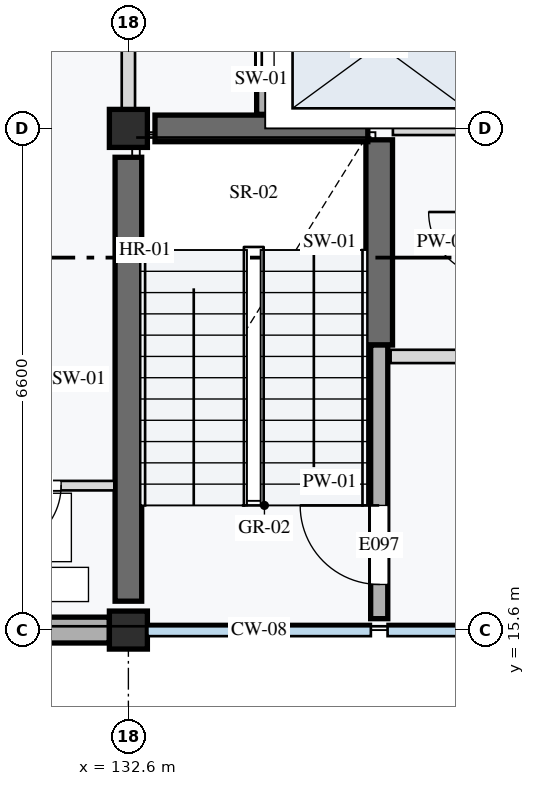
"""IFC4 building model, lengths in metres.
Left out: names, types, materials, properties, quantities, classifications, styles, units other than length and angle.
Written with IfcOpenShell. Run it as: python <this file> out.ifc"""

import sys

from ifc_helpers import new_model, si_unit, direction, frame, frame_2d, origin, origin_2d, place, context, subcontext, project, spatial, rectangle, extrude, element, fill, save


model = new_model("IFC4")
c1 = context("Model", 3, precision=1e-05, world=origin(), true_north=direction((0.0, 1.0)))
c2 = subcontext(c1, "Body", "Model", "MODEL_VIEW")
j1 = project(units=[si_unit("LENGTHUNIT", "METRE"), si_unit("PLANEANGLEUNIT", "RADIAN")], contexts=[c1])
p1 = place(None, origin())
s1 = spatial("IfcSite", under=j1, at=p1, CompositionType="ELEMENT")
p2 = place(p1, origin())
s2 = spatial("IfcBuilding", under=s1, at=p2, CompositionType="ELEMENT")
p3 = place(p2, frame((0.0, 0.0, 4.2)))
s3 = spatial("IfcBuildingStorey", under=s2, at=p3, CompositionType="ELEMENT", Elevation=4.2)
for number, where, z_axis, x_axis in (
    (1, (132.6, 15.6, 0.0), (0.0, 0.0, 1.0), (1.0, 0.0, 0.0)),
    (2, (132.6, 22.2, 0.0), (0.0, 0.0, 1.0), (1.0, 0.0, 0.0)),
):
    element("IfcColumn", number, at=place(p3, frame(where, z_axis=z_axis, x_axis=x_axis)), inside=s3, PredefinedType="COLUMN", context=c2, shape_type="SweptSolid", body=[
        extrude(rectangle(XDim=0.5, YDim=0.5, at=origin_2d()), origin(), (0.0, 0.0, 1.0), 4.2),
    ])
p4 = place(p3, frame((132.6, 15.98, 0.0), z_axis=(0.0, 0.0, 1.0), x_axis=(0.0, 1.0, 0.0)))
e3 = element("IfcWall", 3, at=p4, inside=s3, PredefinedType="SHEAR", context=c2, shape_type="SweptSolid", body=[
    extrude(rectangle(XDim=5.84, YDim=0.35, at=frame_2d((2.92, 0.0))), origin(), (0.0, 0.0, 1.0), 3.96),
])
p5 = place(p3, frame((135.9, 19.35, 0.0), z_axis=(0.0, 0.0, 1.0), x_axis=(0.0, 1.0, 0.0)))
e4 = element("IfcWall", 4, at=p5, inside=s3, PredefinedType="SHEAR", context=c2, shape_type="SweptSolid", body=[
    extrude(rectangle(XDim=2.7, YDim=0.35, at=frame_2d((1.35, 0.0))), origin(), (0.0, 0.0, 1.0), 3.96),
])
p6 = place(p3, frame((132.95, 22.2, 0.0), z_axis=(0.0, 0.0, 1.0), x_axis=(1.0, 0.0, 0.0)))
e5 = element("IfcWall", 5, at=p6, inside=s3, PredefinedType="SHEAR", context=c2, shape_type="SweptSolid", body=[
    extrude(rectangle(XDim=2.8, YDim=0.35, at=frame_2d((1.4, 0.0))), origin(), (0.0, 0.0, 1.0), 3.96),
])
p7 = place(p3, frame((126.25, 15.6, 0.0), z_axis=(0.0, 0.0, 1.0), x_axis=(1.0, 0.0, 0.0)))
e6 = element("IfcWall", 6, at=p7, inside=s3, PredefinedType="STANDARD", context=c2, shape_type="SweptSolid", body=[
    extrude(rectangle(XDim=6.1, YDim=0.34, at=frame_2d((3.05, 0.0))), origin(), (0.0, 0.0, 1.0), 3.65),
])
p8 = place(p3, frame((135.9, 15.75, 0.0), z_axis=(0.0, 0.0, 1.0), x_axis=(0.0, 1.0, 0.0)))
e7 = element("IfcWall", 7, at=p8, inside=s3, PredefinedType="STANDARD", context=c2, shape_type="SweptSolid", body=[
    extrude(rectangle(XDim=3.6, YDim=0.225, at=frame_2d((1.8, 0.0))), origin(), (0.0, 0.0, 1.0), 3.96),
])
p9 = place(p8, frame((0.45, 0.0, 0.0)))
e8 = element("IfcOpeningElement", 8, at=p9, cuts=e7, PredefinedType="OPENING", context=c2, shape_type="SweptSolid", body=[
    extrude(rectangle(XDim=1.04, YDim=2.12, at=frame_2d((0.52, 1.06))), frame((0.0, 0.123, 0.0), z_axis=(0.0, -1.0, 0.0), x_axis=(1.0, 0.0, 0.0)), (0.0, 0.0, 1.0), 0.245),
])
p10 = place(p3, frame((136.05, 19.2, 0.0), z_axis=(0.0, 0.0, 1.0), x_axis=(1.0, 0.0, 0.0)))
e9 = element("IfcWall", 9, at=p10, inside=s3, PredefinedType="PARTITIONING", context=c2, shape_type="SweptSolid", body=[
    extrude(rectangle(XDim=3.0, YDim=0.175, at=frame_2d((1.5, 0.0))), origin(), (0.0, 0.0, 1.0), 3.96),
])
p11 = place(p10, frame((1.65, 0.0, 0.0)))
e10 = element("IfcOpeningElement", 10, at=p11, cuts=e9, PredefinedType="OPENING", context=c2, shape_type="SweptSolid", body=[
    extrude(rectangle(XDim=1.0, YDim=2.1, at=frame_2d((0.5, 1.05))), frame((0.0, 0.097, 0.0), z_axis=(0.0, -1.0, 0.0), x_axis=(1.0, 0.0, 0.0)), (0.0, 0.0, 1.0), 0.195),
])
p12 = place(p3, frame((136.08, 22.2, 0.0), z_axis=(0.0, 0.0, 1.0), x_axis=(1.0, 0.0, 0.0)))
e11 = element("IfcWall", 11, at=p12, inside=s3, PredefinedType="PARTITIONING", context=c2, shape_type="SweptSolid", body=[
    extrude(rectangle(XDim=1.19, YDim=0.175, at=frame_2d((0.595, 0.0))), origin(), (0.0, 0.0, 1.0), 3.96),
])
p13 = place(p3, frame((134.4, 22.385, 0.0), z_axis=(0.0, 0.0, 1.0), x_axis=(0.0, 1.0, 0.0)))
e12 = element("IfcWall", 12, at=p13, inside=s3, PredefinedType="STANDARD", context=c2, shape_type="SweptSolid", body=[
    extrude(rectangle(XDim=2.015, YDim=0.225, at=frame_2d((1.007, 0.0))), origin(), (0.0, 0.0, 1.0), 3.96),
])
p14 = place(p13, frame((0.55, 0.0, 0.0)))
e13 = element("IfcOpeningElement", 13, at=p14, cuts=e12, PredefinedType="OPENING", context=c2, shape_type="SweptSolid", body=[
    extrude(rectangle(XDim=1.1, YDim=2.1, at=frame_2d((0.55, 1.05))), frame((0.0, 0.123, 0.0), z_axis=(0.0, -1.0, 0.0), x_axis=(1.0, 0.0, 0.0)), (0.0, 0.0, 1.0), 0.245),
])
p15 = place(p3, frame((132.6, 22.2, 0.0), z_axis=(0.0, 0.0, 1.0), x_axis=(0.0, 1.0, 0.0)))
e14 = element("IfcWall", 14, at=p15, inside=s3, PredefinedType="PARTITIONING", context=c2, shape_type="SweptSolid", body=[
    extrude(rectangle(XDim=6.6, YDim=0.175, at=frame_2d((3.3, 0.0))), origin(), (0.0, 0.0, 1.0), 3.7),
])
p16 = place(p15, frame((1.7, 0.0, 0.0)))
e15 = element("IfcOpeningElement", 15, at=p16, cuts=e14, PredefinedType="OPENING", context=c2, shape_type="SweptSolid", body=[
    extrude(rectangle(XDim=0.95, YDim=2.16, at=frame_2d((0.475, 1.08))), frame((0.0, 0.097, 0.0), z_axis=(0.0, -1.0, 0.0), x_axis=(1.0, 0.0, 0.0)), (0.0, 0.0, 1.0), 0.195),
])
p17 = place(p3, frame((132.415, 17.5, 0.0), z_axis=(0.0, 0.0, 1.0), x_axis=(-1.0, 0.0, 0.0)))
e16 = element("IfcWall", 16, at=p17, inside=s3, PredefinedType="PARTITIONING", context=c2, shape_type="SweptSolid", body=[
    extrude(rectangle(XDim=2.215, YDim=0.125, at=frame_2d((1.107, 0.0))), origin(), (0.0, 0.0, 1.0), 3.96),
])
p18 = place(p17, frame((0.7, 0.0, 0.0)))
e17 = element("IfcOpeningElement", 17, at=p18, cuts=e16, PredefinedType="OPENING", context=c2, shape_type="SweptSolid", body=[
    extrude(rectangle(XDim=0.84, YDim=2.06, at=frame_2d((0.42, 1.03))), frame((0.0, 0.073, 0.0), z_axis=(0.0, -1.0, 0.0), x_axis=(1.0, 0.0, 0.0)), (0.0, 0.0, 1.0), 0.145),
])
p19 = place(p9, origin())
e18 = element("IfcDoor", 18, at=p19, inside=s3, OperationType="SINGLE_SWING_RIGHT", PredefinedType="DOOR", context=c2, shape_type="SweptSolid", body=[
    extrude(rectangle(XDim=1.04, YDim=2.12, at=frame_2d((0.52, 1.06))), frame((0.0, 0.025, 0.0), z_axis=(0.0, -1.0, 0.0), x_axis=(1.0, 0.0, 0.0)), (0.0, 0.0, 1.0), 0.05),
])
fill(e8, e18)
p20 = place(p14, origin())
e19 = element("IfcDoor", 19, at=p20, inside=s3, OperationType="DOUBLE_DOOR_SLIDING", PredefinedType="DOOR", context=c2, shape_type="SweptSolid", body=[
    extrude(rectangle(XDim=1.1, YDim=2.1, at=frame_2d((0.55, 1.05))), frame((0.0, 0.025, 0.0), z_axis=(0.0, -1.0, 0.0), x_axis=(1.0, 0.0, 0.0)), (0.0, 0.0, 1.0), 0.05),
])
fill(e13, e19)
p21 = place(p18, origin())
e20 = element("IfcDoor", 20, at=p21, inside=s3, OperationType="SINGLE_SWING_RIGHT", PredefinedType="DOOR", context=c2, shape_type="SweptSolid", body=[
    extrude(rectangle(XDim=0.84, YDim=2.06, at=frame_2d((0.42, 1.03))), frame((0.0, 0.025, 0.0), z_axis=(0.0, -1.0, 0.0), x_axis=(1.0, 0.0, 0.0)), (0.0, 0.0, 1.0), 0.05),
])
fill(e17, e20)
save(model, sys.argv[1])
